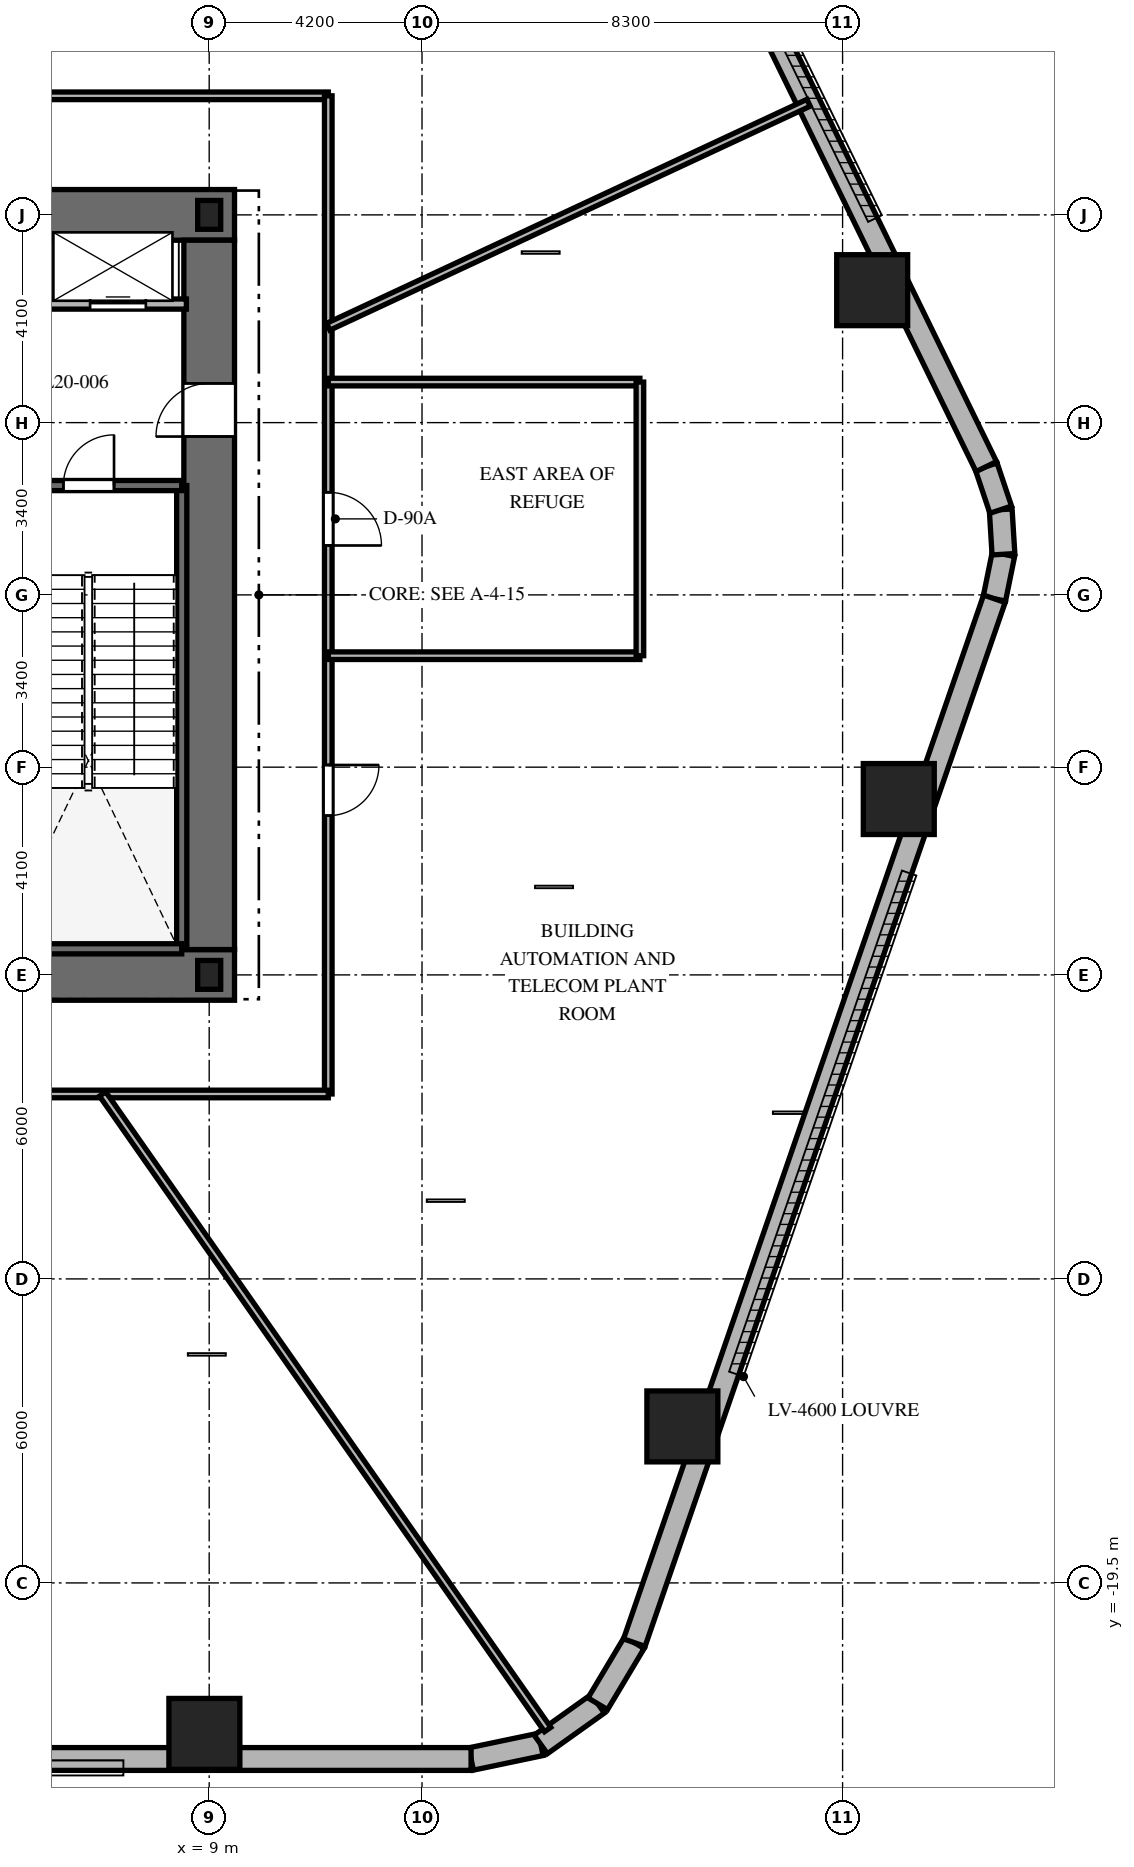
"""IFC4 building model, lengths in metres.
Left out: names, types, materials, properties, quantities, classifications, styles, units other than length and angle.
Written with IfcOpenShell. Run it as: python <this file> out.ifc"""

import sys

from ifc_helpers import new_model, si_unit, direction, frame, frame_2d, origin, origin_2d, place, context, subcontext, project, spatial, rectangle, i_section, extrude, element, fill, save


model = new_model("IFC4")
c1 = context("Model", 3, precision=1e-05, world=origin(), true_north=direction((0.0, 1.0)))
c2 = subcontext(c1, "Body", "Model", "MODEL_VIEW")
j1 = project(units=[si_unit("LENGTHUNIT", "METRE"), si_unit("PLANEANGLEUNIT", "RADIAN")], contexts=[c1])
p1 = place(None, origin())
s1 = spatial("IfcSite", under=j1, at=p1, CompositionType="ELEMENT")
p2 = place(p1, origin())
s2 = spatial("IfcBuilding", under=s1, at=p2, CompositionType="ELEMENT")
p3 = place(p2, frame((0.0, 0.0, 86.0)))
s3 = spatial("IfcBuildingStorey", under=s2, at=p3, CompositionType="ELEMENT", Elevation=86.0)
p4 = place(p3, frame((-9.5, -7.5, 0.0), z_axis=(0.0, 0.0, 1.0), x_axis=(1.0, 0.0, 0.0)))
e1 = element("IfcWall", 1, at=p4, inside=s3, PredefinedType="SHEAR", context=c2, shape_type="SweptSolid", body=[
    extrude(rectangle(XDim=19.0, YDim=1.0, at=frame_2d((9.5, 0.0))), origin(), (0.0, 0.0, 1.0), 5.4),
])
p5 = place(p4, frame((9.55, 0.0, 0.0)))
e2 = element("IfcOpeningElement", 2, at=p5, cuts=e1, PredefinedType="OPENING", context=c2, shape_type="SweptSolid", body=[
    extrude(rectangle(XDim=1.0, YDim=2.15, at=frame_2d((0.5, 1.075))), frame((0.0, 0.51, 0.0), z_axis=(0.0, -1.0, 0.0), x_axis=(1.0, 0.0, 0.0)), (0.0, 0.0, 1.0), 1.02),
])
p6 = place(p3, frame((1.85, 7.5, 0.0), z_axis=(0.0, 0.0, 1.0), x_axis=(1.0, 0.0, 0.0)))
e3 = element("IfcWall", 3, at=p6, inside=s3, PredefinedType="SHEAR", context=c2, shape_type="SweptSolid", body=[
    extrude(rectangle(XDim=7.65, YDim=1.0, at=frame_2d((3.825, 0.0))), origin(), (0.0, 0.0, 1.0), 5.4),
])
p7 = place(p3, frame((9.0, -7.0, 0.0), z_axis=(0.0, 0.0, 1.0), x_axis=(0.0, 1.0, 0.0)))
e4 = element("IfcWall", 4, at=p7, inside=s3, PredefinedType="SHEAR", context=c2, shape_type="SweptSolid", body=[
    extrude(rectangle(XDim=14.0, YDim=1.0, at=frame_2d((7.0, 0.0))), origin(), (0.0, 0.0, 1.0), 5.4),
])
p8 = place(p7, frame((10.125, 0.0, 0.0)))
e5 = element("IfcOpeningElement", 5, at=p8, cuts=e4, PredefinedType="OPENING", context=c2, shape_type="SweptSolid", body=[
    extrude(rectangle(XDim=1.05, YDim=2.15, at=frame_2d((0.525, 1.075))), frame((0.0, 0.51, 0.0), z_axis=(0.0, -1.0, 0.0), x_axis=(1.0, 0.0, 0.0)), (0.0, 0.0, 1.0), 1.02),
])
p9 = place(p3, frame((8.458, -6.985, 0.0), z_axis=(0.0, 0.0, 1.0), x_axis=(0.0, 1.0, 0.0)))
e6 = element("IfcWall", 6, at=p9, inside=s3, PredefinedType="SHEAR", context=c2, shape_type="SweptSolid", body=[
    extrude(rectangle(XDim=9.143, YDim=0.2, at=frame_2d((4.572, 0.0))), origin(), (0.0, 0.0, 1.0), 5.4),
])
p10 = place(p3, frame((4.772, -6.985, 0.0), z_axis=(0.0, 0.0, 1.0), x_axis=(1.0, 0.0, 0.0)))
e7 = element("IfcWall", 7, at=p10, inside=s3, PredefinedType="SHEAR", context=c2, shape_type="SweptSolid", body=[
    extrude(rectangle(XDim=3.686, YDim=0.2, at=frame_2d((1.843, 0.0))), origin(), (0.0, 0.0, 1.0), 5.4),
])
p11 = place(p3, frame((4.772, 2.158, 0.0), z_axis=(0.0, 0.0, 1.0), x_axis=(1.0, 0.0, 0.0)))
e8 = element("IfcWall", 8, at=p11, inside=s3, PredefinedType="SHEAR", context=c2, shape_type="SweptSolid", body=[
    extrude(rectangle(XDim=3.686, YDim=0.2, at=frame_2d((1.843, 0.0))), origin(), (0.0, 0.0, 1.0), 5.4),
])
p12 = place(p11, frame((1.35, 0.0, 0.0)))
e9 = element("IfcOpeningElement", 9, at=p12, cuts=e8, PredefinedType="OPENING", context=c2, shape_type="SweptSolid", body=[
    extrude(rectangle(XDim=1.0, YDim=2.15, at=frame_2d((0.5, 1.075))), frame((0.0, 0.11, 0.0), z_axis=(0.0, -1.0, 0.0), x_axis=(1.0, 0.0, 0.0)), (0.0, 0.0, 1.0), 0.22),
])
for number, where, z_axis, x_axis in (
    (10, (9.0, -7.5, 0.0), (0.0, 0.0, 1.0), (1.0, 0.0, 0.0)),
    (11, (9.0, 7.5, 0.0), (0.0, 0.0, 1.0), (1.0, 0.0, 0.0)),
):
    element("IfcColumn", number, at=place(p3, frame(where, z_axis=z_axis, x_axis=x_axis)), inside=s3, PredefinedType="COLUMN", context=c2, shape_type="SweptSolid", body=[
        extrude(i_section(OverallWidth=0.454, OverallDepth=0.569, WebThickness=0.078, FlangeThickness=0.125, at=origin_2d()), origin(), (0.0, 0.0, 1.0), 5.4),
    ])
for number, where, z_axis, x_axis in (
    (12, (8.905, -22.48, 0.0), (0.0, 0.0, 1.0), (1.0, 0.0, 0.0)),
    (13, (18.338, -16.411, 0.0), (0.0, 0.0, 1.0), (1.0, 0.0, 0.0)),
    (14, (22.609, -4.029, 0.0), (0.0, 0.0, 1.0), (1.0, 0.0, 0.0)),
    (15, (22.084, 6.014, 0.0), (0.0, 0.0, 1.0), (1.0, 0.0, 0.0)),
):
    element("IfcColumn", number, at=place(p3, frame(where, z_axis=z_axis, x_axis=x_axis)), inside=s3, PredefinedType="COLUMN", context=c2, shape_type="SweptSolid", body=[
        extrude(rectangle(XDim=1.4, YDim=1.4, at=origin_2d()), origin(), (0.0, 0.0, 1.0), 5.4),
    ])
p13 = place(p3, frame((14.168, -22.975, 0.0), z_axis=(0.0, 0.0, 1.0), x_axis=(0.978770371074, 0.204959900243, 0.0)))
e16 = element("IfcWall", 16, at=p13, inside=s3, PredefinedType="SOLIDWALL", context=c2, shape_type="SweptSolid", body=[
    extrude(rectangle(XDim=1.406, YDim=0.45, at=frame_2d((0.703, 0.0))), origin(), (0.0, 0.0, 1.0), 5.1),
])
p14 = place(p3, frame((15.544, -22.687, 0.0), z_axis=(0.0, 0.0, 1.0), x_axis=(0.814210854316, 0.580569276412, 0.0)))
e17 = element("IfcWall", 17, at=p14, inside=s3, PredefinedType="SOLIDWALL", context=c2, shape_type="SweptSolid", body=[
    extrude(rectangle(XDim=1.381, YDim=0.45, at=frame_2d((0.691, 0.0))), origin(), (0.0, 0.0, 1.0), 5.1),
])
p15 = place(p3, frame((16.669, -21.885, 0.0), z_axis=(0.0, 0.0, 1.0), x_axis=(0.512936712947, 0.858426425799, 0.0)))
e18 = element("IfcWall", 18, at=p15, inside=s3, PredefinedType="SOLIDWALL", context=c2, shape_type="SweptSolid", body=[
    extrude(rectangle(XDim=1.406, YDim=0.45, at=frame_2d((0.703, 0.0))), origin(), (0.0, 0.0, 1.0), 5.1),
])
p16 = place(p3, frame((24.496, -0.077, 0.0), z_axis=(0.0, 0.0, 1.0), x_axis=(0.199570594521, 0.979883451132, 0.0)))
e19 = element("IfcWall", 19, at=p16, inside=s3, PredefinedType="SOLIDWALL", context=c2, shape_type="SweptSolid", body=[
    extrude(rectangle(XDim=0.897, YDim=0.45, at=frame_2d((0.448, 0.0))), origin(), (0.0, 0.0, 1.0), 5.1),
])
p17 = place(p3, frame((24.675, 0.802, 0.0), z_axis=(0.0, 0.0, 1.0), x_axis=(-0.061188874166, 0.998126205286, 0.0)))
e20 = element("IfcWall", 20, at=p17, inside=s3, PredefinedType="SOLIDWALL", context=c2, shape_type="SweptSolid", body=[
    extrude(rectangle(XDim=0.882, YDim=0.45, at=frame_2d((0.441, 0.0))), origin(), (0.0, 0.0, 1.0), 5.1),
])
p18 = place(p3, frame((24.621, 1.682, 0.0), z_axis=(0.0, 0.0, 1.0), x_axis=(-0.317697451681, 0.948192137278, 0.0)))
e21 = element("IfcWall", 21, at=p18, inside=s3, PredefinedType="SOLIDWALL", context=c2, shape_type="SweptSolid", body=[
    extrude(rectangle(XDim=0.897, YDim=0.45, at=frame_2d((0.448, 0.0))), origin(), (0.0, 0.0, 1.0), 5.1),
])
p19 = place(p3, frame((-12.221, -22.975, 0.0), z_axis=(0.0, 0.0, 1.0), x_axis=(1.0, 0.0, 0.0)))
e22 = element("IfcWall", 22, at=p19, inside=s3, PredefinedType="SOLIDWALL", context=c2, shape_type="SweptSolid", body=[
    extrude(rectangle(XDim=26.389, YDim=0.45, at=frame_2d((13.195, 0.0))), origin(), (0.0, 0.0, 1.0), 5.1),
])
p20 = place(p3, frame((17.39, -20.678, 0.0), z_axis=(0.0, 0.0, 1.0), x_axis=(0.326068018294, 0.945346310854, 0.0)))
e23 = element("IfcWall", 23, at=p20, inside=s3, PredefinedType="SOLIDWALL", context=c2, shape_type="SweptSolid", body=[
    extrude(rectangle(XDim=21.793, YDim=0.45, at=frame_2d((10.896, 0.0))), origin(), (0.0, 0.0, 1.0), 5.1),
])
p21 = place(p3, frame((24.336, 2.532, 0.0), z_axis=(0.0, 0.0, 1.0), x_axis=(-0.438931326393, 0.898520612291, 0.0)))
e24 = element("IfcWall", 24, at=p21, inside=s3, PredefinedType="SOLIDWALL", context=c2, shape_type="SweptSolid", body=[
    extrude(rectangle(XDim=20.623, YDim=0.45, at=frame_2d((10.312, 0.0))), origin(), (0.0, 0.0, 1.0), 5.1),
])
p22 = place(p3, frame((4.5, 5.74, 0.0), z_axis=(0.0, 0.0, 1.0), x_axis=(1.0, 0.0, 0.0)))
e25 = element("IfcWall", 25, at=p22, inside=s3, PredefinedType="PARTITIONING", context=c2, shape_type="SweptSolid", body=[
    extrude(rectangle(XDim=4.05, YDim=0.2, at=frame_2d((2.025, 0.0))), origin(), (0.0, 0.0, 1.0), 5.1),
])
p23 = place(p22, frame((0.3, 0.0, 0.0)))
e26 = element("IfcOpeningElement", 26, at=p23, cuts=e25, PredefinedType="OPENING", context=c2, shape_type="SweptSolid", body=[
    extrude(rectangle(XDim=0.85, YDim=2.03, at=frame_2d((0.425, 1.015))), frame((0.0, 0.11, 0.0), z_axis=(0.0, -1.0, 0.0), x_axis=(1.0, 0.0, 0.0)), (0.0, 0.0, 1.0), 0.22),
])
p24 = place(p22, frame((2.15, 0.0, 0.0)))
e27 = element("IfcOpeningElement", 27, at=p24, cuts=e25, PredefinedType="OPENING", context=c2, shape_type="SweptSolid", body=[
    extrude(rectangle(XDim=1.1, YDim=2.2, at=frame_2d((0.55, 1.1))), frame((0.0, 0.11, 0.0), z_axis=(0.0, -1.0, 0.0), x_axis=(1.0, 0.0, 0.0)), (0.0, 0.0, 1.0), 0.22),
])
p25 = place(p3, frame((-11.35, 9.85, 0.0), z_axis=(0.0, 0.0, 1.0), x_axis=(1.0, 0.0, 0.0)))
e28 = element("IfcWall", 28, at=p25, inside=s3, PredefinedType="PARTITIONING", context=c2, shape_type="SweptSolid", body=[
    extrude(rectangle(XDim=22.7, YDim=0.15, at=frame_2d((11.35, 0.0))), origin(), (0.0, 0.0, 1.0), 3.29),
])
p26 = place(p25, frame((15.974, 0.0, 0.0)))
e29 = element("IfcOpeningElement", 29, at=p26, cuts=e28, PredefinedType="OPENING", context=c2, shape_type="SweptSolid", body=[
    extrude(rectangle(XDim=1.0, YDim=2.15, at=frame_2d((0.5, 1.075))), frame((0.0, 0.085, 0.0), z_axis=(0.0, -1.0, 0.0), x_axis=(1.0, 0.0, 0.0)), (0.0, 0.0, 1.0), 0.17),
])
p27 = place(p3, frame((11.35, 9.85, 0.0), z_axis=(0.0, 0.0, 1.0), x_axis=(0.0, -1.0, 0.0)))
e30 = element("IfcWall", 30, at=p27, inside=s3, PredefinedType="PARTITIONING", context=c2, shape_type="SweptSolid", body=[
    extrude(rectangle(XDim=19.7, YDim=0.15, at=frame_2d((9.85, 0.0))), origin(), (0.0, 0.0, 1.0), 3.29),
])
p28 = place(p27, frame((7.825, 0.0, 0.0)))
e31 = element("IfcOpeningElement", 31, at=p28, cuts=e30, PredefinedType="OPENING", context=c2, shape_type="SweptSolid", body=[
    extrude(rectangle(XDim=1.05, YDim=2.15, at=frame_2d((0.525, 1.075))), frame((0.0, 0.085, 0.0), z_axis=(0.0, -1.0, 0.0), x_axis=(1.0, 0.0, 0.0)), (0.0, 0.0, 1.0), 0.17),
])
p29 = place(p27, frame((13.207, 0.0, 0.0)))
e32 = element("IfcOpeningElement", 32, at=p29, cuts=e30, PredefinedType="OPENING", context=c2, shape_type="SweptSolid", body=[
    extrude(rectangle(XDim=1.0, YDim=2.15, at=frame_2d((0.5, 1.075))), frame((0.0, 0.085, 0.0), z_axis=(0.0, -1.0, 0.0), x_axis=(1.0, 0.0, 0.0)), (0.0, 0.0, 1.0), 0.17),
])
p30 = place(p3, frame((11.35, -9.85, 0.0), z_axis=(0.0, 0.0, 1.0), x_axis=(-1.0, 0.0, 0.0)))
e33 = element("IfcWall", 33, at=p30, inside=s3, PredefinedType="PARTITIONING", context=c2, shape_type="SweptSolid", body=[
    extrude(rectangle(XDim=22.7, YDim=0.15, at=frame_2d((11.35, 0.0))), origin(), (0.0, 0.0, 1.0), 3.29),
])
p31 = place(p30, frame((10.85, 0.0, 0.0)))
e34 = element("IfcOpeningElement", 34, at=p31, cuts=e33, PredefinedType="OPENING", context=c2, shape_type="SweptSolid", body=[
    extrude(rectangle(XDim=1.0, YDim=2.15, at=frame_2d((0.5, 1.075))), frame((0.0, 0.085, 0.0), z_axis=(0.0, -1.0, 0.0), x_axis=(1.0, 0.0, 0.0)), (0.0, 0.0, 1.0), 0.17),
])
for number, where, z_axis, x_axis in (
    (35, (11.35, -1.2, 0.0), (0.0, 0.0, 1.0), (1.0, 0.0, 0.0)),
    (36, (11.35, 4.2, 0.0), (0.0, 0.0, 1.0), (1.0, 0.0, 0.0)),
):
    element("IfcWall", number, at=place(p3, frame(where, z_axis=z_axis, x_axis=x_axis)), inside=s3, PredefinedType="PARTITIONING", context=c2, shape_type="SweptSolid", body=[
        extrude(rectangle(XDim=6.15, YDim=0.15, at=frame_2d((3.075, 0.0))), origin(), (0.0, 0.0, 1.0), 4.626),
    ])
p32 = place(p3, frame((17.5, -1.2, 0.0), z_axis=(0.0, 0.0, 1.0), x_axis=(0.0, 1.0, 0.0)))
e37 = element("IfcWall", 37, at=p32, inside=s3, PredefinedType="PARTITIONING", context=c2, shape_type="SweptSolid", body=[
    extrude(rectangle(XDim=5.4, YDim=0.15, at=frame_2d((2.7, 0.0))), origin(), (0.0, 0.0, 1.0), 5.1),
])
p33 = place(p3, frame((11.35, 5.292, 0.0), z_axis=(0.0, 0.0, 1.0), x_axis=(0.906302978375, 0.422628573796, 0.0)))
e38 = element("IfcWall", 38, at=p33, inside=s3, PredefinedType="PARTITIONING", context=c2, shape_type="SweptSolid", body=[
    extrude(rectangle(XDim=10.458, YDim=0.15, at=frame_2d((5.229, 0.0))), origin(), (0.0, 0.0, 1.0), 3.29),
])
p34 = place(p3, frame((6.897, -9.85, 0.0), z_axis=(0.0, 0.0, 1.0), x_axis=(0.573581114898, -0.819148768315, 0.0)))
e39 = element("IfcWall", 39, at=p34, inside=s3, PredefinedType="PARTITIONING", context=c2, shape_type="SweptSolid", body=[
    extrude(rectangle(XDim=15.312, YDim=0.15, at=frame_2d((7.656, 0.0))), origin(), (0.0, 0.0, 1.0), 3.29),
])
p35 = place(p12, origin())
e40 = element("IfcDoor", 40, at=p35, inside=s3, OperationType="SINGLE_SWING_RIGHT", PredefinedType="DOOR", context=c2, shape_type="SweptSolid", body=[
    extrude(rectangle(XDim=1.0, YDim=2.15, at=frame_2d((0.5, 1.075))), frame((0.0, 0.025, 0.0), z_axis=(0.0, -1.0, 0.0), x_axis=(1.0, 0.0, 0.0)), (0.0, 0.0, 1.0), 0.05),
])
fill(e9, e40)
p36 = place(p8, origin())
e41 = element("IfcDoor", 41, at=p36, inside=s3, OperationType="SINGLE_SWING_LEFT", PredefinedType="DOOR", context=c2, shape_type="SweptSolid", body=[
    extrude(rectangle(XDim=1.05, YDim=2.15, at=frame_2d((0.525, 1.075))), frame((0.0, 0.025, 0.0), z_axis=(0.0, -1.0, 0.0), x_axis=(1.0, 0.0, 0.0)), (0.0, 0.0, 1.0), 0.05),
])
fill(e5, e41)
p37 = place(p24, origin())
e42 = element("IfcDoor", 42, at=p37, inside=s3, OperationType="SLIDING_TO_RIGHT", PredefinedType="DOOR", context=c2, shape_type="SweptSolid", body=[
    extrude(rectangle(XDim=1.1, YDim=2.2, at=frame_2d((0.55, 1.1))), frame((0.0, 0.025, 0.0), z_axis=(0.0, -1.0, 0.0), x_axis=(1.0, 0.0, 0.0)), (0.0, 0.0, 1.0), 0.05),
])
fill(e27, e42)
p38 = place(p28, origin())
e43 = element("IfcDoor", 43, at=p38, inside=s3, OperationType="SINGLE_SWING_RIGHT", PredefinedType="DOOR", context=c2, shape_type="SweptSolid", body=[
    extrude(rectangle(XDim=1.05, YDim=2.15, at=frame_2d((0.525, 1.075))), frame((0.0, 0.025, 0.0), z_axis=(0.0, -1.0, 0.0), x_axis=(1.0, 0.0, 0.0)), (0.0, 0.0, 1.0), 0.05),
])
fill(e31, e43)
p39 = place(p29, origin())
e44 = element("IfcDoor", 44, at=p39, inside=s3, OperationType="SINGLE_SWING_LEFT", PredefinedType="DOOR", context=c2, shape_type="SweptSolid", body=[
    extrude(rectangle(XDim=1.0, YDim=2.15, at=frame_2d((0.5, 1.075))), frame((0.0, 0.025, 0.0), z_axis=(0.0, -1.0, 0.0), x_axis=(1.0, 0.0, 0.0)), (0.0, 0.0, 1.0), 0.05),
])
fill(e32, e44)
save(model, sys.argv[1])
